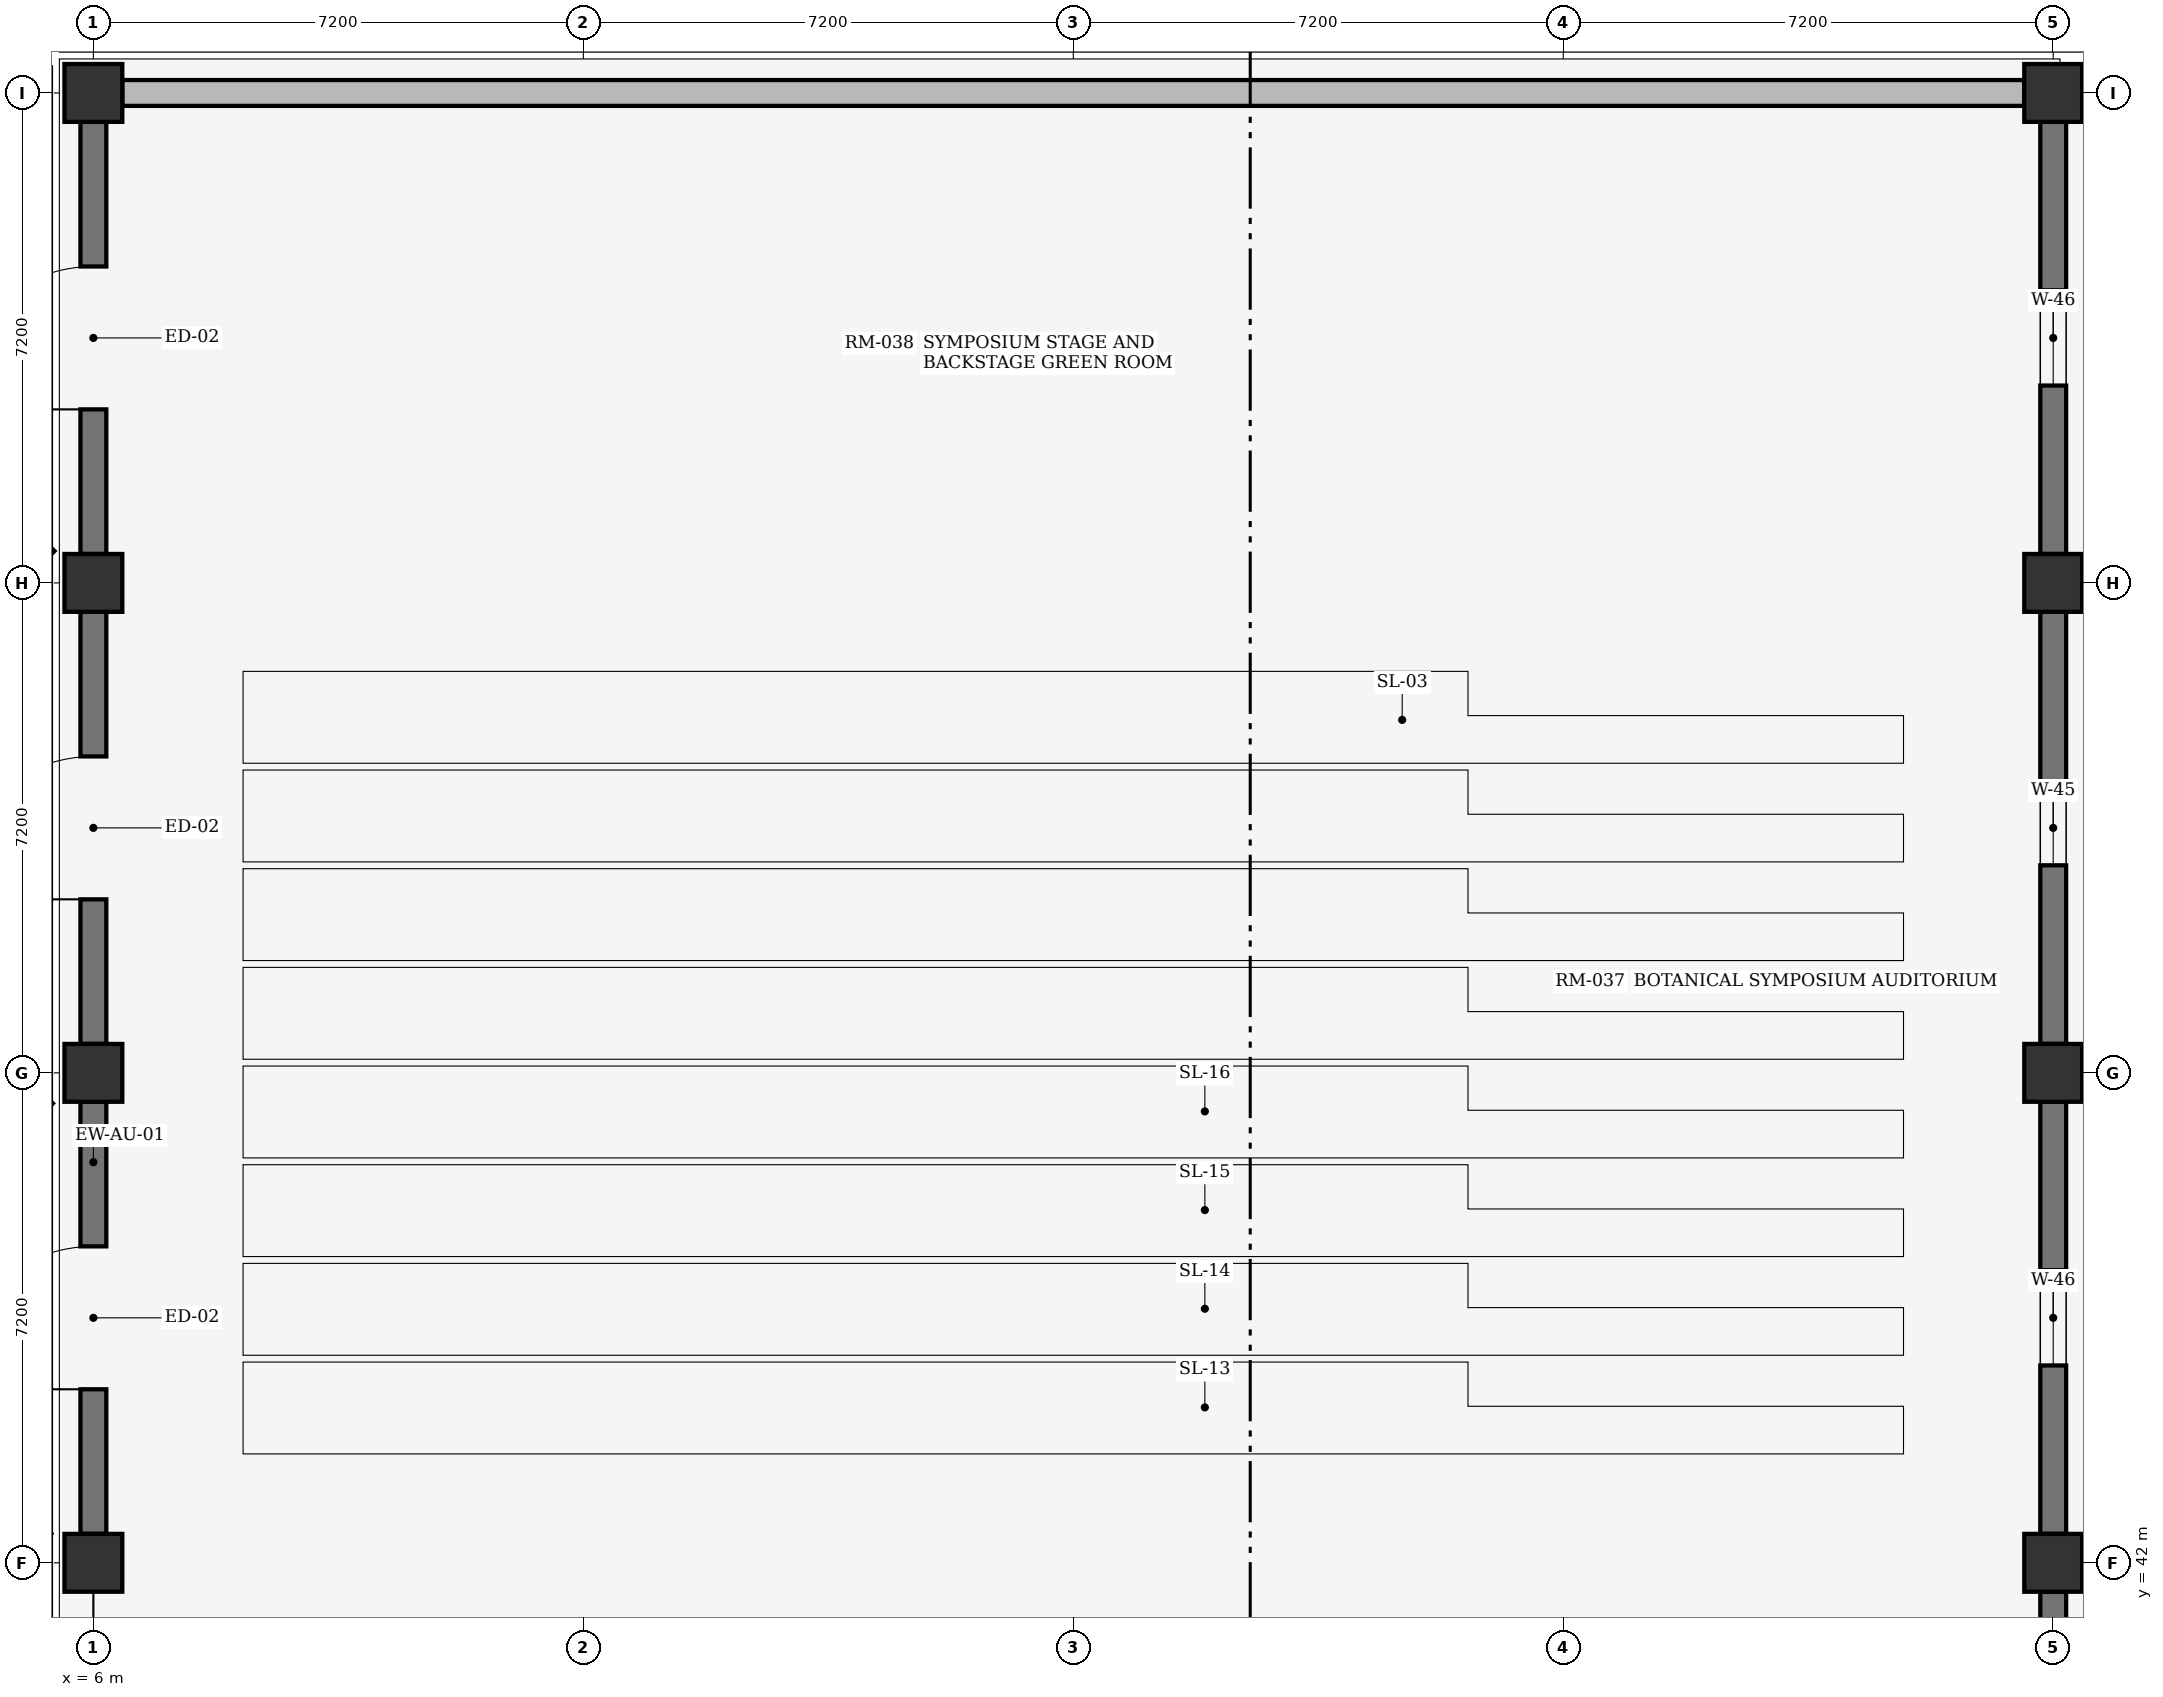
"""IFC4 building model, lengths in metres.
Left out: names, types, materials, properties, quantities, classifications, styles, units other than length and angle.
Written with IfcOpenShell. Run it as: python <this file> out.ifc"""

import sys

from ifc_helpers import new_model, si_unit, direction, frame, frame_2d, origin, origin_2d, place, context, subcontext, project, spatial, rectangle, extrude, element, fill, save


model = new_model("IFC4")
c1 = context("Model", 3, precision=1e-05, world=origin(), true_north=direction((0.0, 1.0)))
c2 = subcontext(c1, "Body", "Model", "MODEL_VIEW")
j1 = project(units=[si_unit("LENGTHUNIT", "METRE"), si_unit("PLANEANGLEUNIT", "RADIAN")], contexts=[c1])
p1 = place(None, origin())
s1 = spatial("IfcSite", under=j1, at=p1, CompositionType="ELEMENT")
p2 = place(p1, origin())
s2 = spatial("IfcBuilding", under=s1, at=p2, CompositionType="ELEMENT")
p3 = place(p2, origin())
s3 = spatial("IfcBuildingStorey", under=s2, at=p3, CompositionType="ELEMENT", Elevation=0.0)
p4 = place(p3, frame((6.0, 42.0, 0.0), z_axis=(0.0, 0.0, 1.0), x_axis=(1.0, 0.0, 0.0)))
e1 = element("IfcColumn", 1, at=p4, inside=s3, PredefinedType="COLUMN", context=c2, shape_type="SweptSolid", body=[
    extrude(rectangle(XDim=0.85, YDim=0.85, at=origin_2d()), origin(), (0.0, 0.0, 1.0), 4.55),
])
for number, where, z_axis, x_axis in (
    (2, (6.0, 49.2, 0.0), (0.0, 0.0, 1.0), (1.0, 0.0, 0.0)),
    (3, (6.0, 56.4, 0.0), (0.0, 0.0, 1.0), (1.0, 0.0, 0.0)),
    (4, (6.0, 63.6, 0.0), (0.0, 0.0, 1.0), (1.0, 0.0, 0.0)),
):
    element("IfcColumn", number, at=place(p3, frame(where, z_axis=z_axis, x_axis=x_axis)), inside=s3, PredefinedType="COLUMN", context=c2, shape_type="SweptSolid", body=[
        extrude(rectangle(XDim=0.85, YDim=0.85, at=origin_2d()), origin(), (0.0, 0.0, 1.0), 4.8),
    ])
p5 = place(p3, frame((34.8, 42.0, 0.0), z_axis=(0.0, 0.0, 1.0), x_axis=(1.0, 0.0, 0.0)))
e5 = element("IfcColumn", 5, at=p5, inside=s3, PredefinedType="COLUMN", context=c2, shape_type="SweptSolid", body=[
    extrude(rectangle(XDim=0.85, YDim=0.85, at=origin_2d()), origin(), (0.0, 0.0, 1.0), 4.55),
])
for number, where, z_axis, x_axis in (
    (6, (34.8, 49.2, 0.0), (0.0, 0.0, 1.0), (1.0, 0.0, 0.0)),
    (7, (34.8, 56.4, 0.0), (0.0, 0.0, 1.0), (1.0, 0.0, 0.0)),
    (8, (34.8, 63.6, 0.0), (0.0, 0.0, 1.0), (1.0, 0.0, 0.0)),
):
    element("IfcColumn", number, at=place(p3, frame(where, z_axis=z_axis, x_axis=x_axis)), inside=s3, PredefinedType="COLUMN", context=c2, shape_type="SweptSolid", body=[
        extrude(rectangle(XDim=0.85, YDim=0.85, at=origin_2d()), origin(), (0.0, 0.0, 1.0), 4.8),
    ])
p6 = place(p3, frame((6.0, 42.425, 0.0), z_axis=(0.0, 0.0, 1.0), x_axis=(0.0, 1.0, 0.0)))
e9 = element("IfcWall", 9, at=p6, inside=s3, PredefinedType="STANDARD", context=c2, shape_type="SweptSolid", body=[
    extrude(rectangle(XDim=6.35, YDim=0.38, at=frame_2d((3.175, 0.0))), origin(), (0.0, 0.0, 1.0), 4.8),
])
p7 = place(p6, frame((2.125, 0.0, 0.0)))
e10 = element("IfcOpeningElement", 10, at=p7, cuts=e9, PredefinedType="OPENING", context=c2, shape_type="SweptSolid", body=[
    extrude(rectangle(XDim=2.1, YDim=2.4, at=frame_2d((1.05, 1.2))), frame((0.0, 0.2, 0.0), z_axis=(0.0, -1.0, 0.0), x_axis=(1.0, 0.0, 0.0)), (0.0, 0.0, 1.0), 0.4),
])
p8 = place(p3, frame((6.0, 49.625, 0.0), z_axis=(0.0, 0.0, 1.0), x_axis=(0.0, 1.0, 0.0)))
e11 = element("IfcWall", 11, at=p8, inside=s3, PredefinedType="STANDARD", context=c2, shape_type="SweptSolid", body=[
    extrude(rectangle(XDim=6.35, YDim=0.38, at=frame_2d((3.175, 0.0))), origin(), (0.0, 0.0, 1.0), 4.8),
])
p9 = place(p8, frame((2.125, 0.0, 0.0)))
e12 = element("IfcOpeningElement", 12, at=p9, cuts=e11, PredefinedType="OPENING", context=c2, shape_type="SweptSolid", body=[
    extrude(rectangle(XDim=2.1, YDim=2.4, at=frame_2d((1.05, 1.2))), frame((0.0, 0.2, 0.0), z_axis=(0.0, -1.0, 0.0), x_axis=(1.0, 0.0, 0.0)), (0.0, 0.0, 1.0), 0.4),
])
p10 = place(p3, frame((6.0, 56.825, 0.0), z_axis=(0.0, 0.0, 1.0), x_axis=(0.0, 1.0, 0.0)))
e13 = element("IfcWall", 13, at=p10, inside=s3, PredefinedType="STANDARD", context=c2, shape_type="SweptSolid", body=[
    extrude(rectangle(XDim=6.35, YDim=0.38, at=frame_2d((3.175, 0.0))), origin(), (0.0, 0.0, 1.0), 4.8),
])
p11 = place(p10, frame((2.125, 0.0, 0.0)))
e14 = element("IfcOpeningElement", 14, at=p11, cuts=e13, PredefinedType="OPENING", context=c2, shape_type="SweptSolid", body=[
    extrude(rectangle(XDim=2.1, YDim=2.4, at=frame_2d((1.05, 1.2))), frame((0.0, 0.2, 0.0), z_axis=(0.0, -1.0, 0.0), x_axis=(1.0, 0.0, 0.0)), (0.0, 0.0, 1.0), 0.4),
])
p12 = place(p3, frame((34.8, 35.225, 0.0), z_axis=(0.0, 0.0, 1.0), x_axis=(0.0, 1.0, 0.0)))
e15 = element("IfcWall", 15, at=p12, inside=s3, PredefinedType="STANDARD", context=c2, shape_type="SweptSolid", body=[
    extrude(rectangle(XDim=6.35, YDim=0.38, at=frame_2d((3.175, 0.0))), origin(), (0.0, 0.0, 1.0), 4.8),
])
p13 = place(p12, frame((2.225, 0.0, 0.0)))
e16 = element("IfcOpeningElement", 16, at=p13, cuts=e15, PredefinedType="OPENING", context=c2, shape_type="SweptSolid", body=[
    extrude(rectangle(XDim=1.9, YDim=2.3, at=frame_2d((0.95, 1.15))), frame((0.0, 0.2, 0.0), z_axis=(0.0, -1.0, 0.0), x_axis=(1.0, 0.0, 0.0)), (0.0, 0.0, 1.0), 0.4),
])
p14 = place(p3, frame((34.8, 42.425, 0.0), z_axis=(0.0, 0.0, 1.0), x_axis=(0.0, 1.0, 0.0)))
e17 = element("IfcWall", 17, at=p14, inside=s3, PredefinedType="STANDARD", context=c2, shape_type="SweptSolid", body=[
    extrude(rectangle(XDim=6.35, YDim=0.38, at=frame_2d((3.175, 0.0))), origin(), (0.0, 0.0, 1.0), 4.8),
])
p15 = place(p14, frame((2.475, 0.0, 0.75)))
e18 = element("IfcOpeningElement", 18, at=p15, cuts=e17, PredefinedType="OPENING", context=c2, shape_type="SweptSolid", body=[
    extrude(rectangle(XDim=1.4, YDim=1.25, at=frame_2d((0.7, 0.625))), frame((0.0, 0.2, 0.0), z_axis=(0.0, -1.0, 0.0), x_axis=(1.0, 0.0, 0.0)), (0.0, 0.0, 1.0), 0.4),
])
p16 = place(p3, frame((34.8, 49.625, 0.0), z_axis=(0.0, 0.0, 1.0), x_axis=(0.0, 1.0, 0.0)))
e19 = element("IfcWall", 19, at=p16, inside=s3, PredefinedType="STANDARD", context=c2, shape_type="SweptSolid", body=[
    extrude(rectangle(XDim=6.35, YDim=0.38, at=frame_2d((3.175, 0.0))), origin(), (0.0, 0.0, 1.0), 4.8),
])
p17 = place(p16, frame((2.625, 0.0, 0.75)))
e20 = element("IfcOpeningElement", 20, at=p17, cuts=e19, PredefinedType="OPENING", context=c2, shape_type="SweptSolid", body=[
    extrude(rectangle(XDim=1.1, YDim=1.25, at=frame_2d((0.55, 0.625))), frame((0.0, 0.2, 0.0), z_axis=(0.0, -1.0, 0.0), x_axis=(1.0, 0.0, 0.0)), (0.0, 0.0, 1.0), 0.4),
])
p18 = place(p3, frame((34.8, 56.825, 0.0), z_axis=(0.0, 0.0, 1.0), x_axis=(0.0, 1.0, 0.0)))
e21 = element("IfcWall", 21, at=p18, inside=s3, PredefinedType="STANDARD", context=c2, shape_type="SweptSolid", body=[
    extrude(rectangle(XDim=6.35, YDim=0.38, at=frame_2d((3.175, 0.0))), origin(), (0.0, 0.0, 1.0), 4.8),
])
p19 = place(p18, frame((2.475, 0.0, 0.75)))
e22 = element("IfcOpeningElement", 22, at=p19, cuts=e21, PredefinedType="OPENING", context=c2, shape_type="SweptSolid", body=[
    extrude(rectangle(XDim=1.4, YDim=1.25, at=frame_2d((0.7, 0.625))), frame((0.0, 0.2, 0.0), z_axis=(0.0, -1.0, 0.0), x_axis=(1.0, 0.0, 0.0)), (0.0, 0.0, 1.0), 0.4),
])
p20 = place(p3, frame((6.425, 63.6, 0.0), z_axis=(0.0, 0.0, 1.0), x_axis=(1.0, 0.0, 0.0)))
e23 = element("IfcWall", 23, at=p20, inside=s3, PredefinedType="STANDARD", context=c2, shape_type="SweptSolid", body=[
    extrude(rectangle(XDim=27.95, YDim=0.38, at=frame_2d((13.975, 0.0))), origin(), (0.0, 0.0, 1.0), 4.8),
])
p21 = place(p7, origin())
e24 = element("IfcDoor", 24, at=p21, inside=s3, OperationType="DOUBLE_DOOR_SINGLE_SWING", PredefinedType="DOOR", context=c2, shape_type="SweptSolid", body=[
    extrude(rectangle(XDim=2.1, YDim=2.4, at=frame_2d((1.05, 1.2))), frame((0.0, 0.025, 0.0), z_axis=(0.0, -1.0, 0.0), x_axis=(1.0, 0.0, 0.0)), (0.0, 0.0, 1.0), 0.05),
])
fill(e10, e24)
p22 = place(p9, origin())
e25 = element("IfcDoor", 25, at=p22, inside=s3, OperationType="DOUBLE_DOOR_SINGLE_SWING", PredefinedType="DOOR", context=c2, shape_type="SweptSolid", body=[
    extrude(rectangle(XDim=2.1, YDim=2.4, at=frame_2d((1.05, 1.2))), frame((0.0, 0.025, 0.0), z_axis=(0.0, -1.0, 0.0), x_axis=(1.0, 0.0, 0.0)), (0.0, 0.0, 1.0), 0.05),
])
fill(e12, e25)
p23 = place(p11, origin())
e26 = element("IfcDoor", 26, at=p23, inside=s3, OperationType="DOUBLE_DOOR_SINGLE_SWING", PredefinedType="DOOR", context=c2, shape_type="SweptSolid", body=[
    extrude(rectangle(XDim=2.1, YDim=2.4, at=frame_2d((1.05, 1.2))), frame((0.0, 0.025, 0.0), z_axis=(0.0, -1.0, 0.0), x_axis=(1.0, 0.0, 0.0)), (0.0, 0.0, 1.0), 0.05),
])
fill(e14, e26)
p24 = place(p15, origin())
e27 = element("IfcWindow", 27, at=p24, inside=s3, PartitioningType="SINGLE_PANEL", PredefinedType="WINDOW", context=c2, shape_type="SweptSolid", body=[
    extrude(rectangle(XDim=1.4, YDim=1.25, at=frame_2d((0.7, 0.625))), frame((0.0, 0.03, 0.0), z_axis=(0.0, -1.0, 0.0), x_axis=(1.0, 0.0, 0.0)), (0.0, 0.0, 1.0), 0.06),
])
fill(e18, e27)
p25 = place(p17, origin())
e28 = element("IfcWindow", 28, at=p25, inside=s3, PartitioningType="SINGLE_PANEL", PredefinedType="WINDOW", context=c2, shape_type="SweptSolid", body=[
    extrude(rectangle(XDim=1.1, YDim=1.25, at=frame_2d((0.55, 0.625))), frame((0.0, 0.03, 0.0), z_axis=(0.0, -1.0, 0.0), x_axis=(1.0, 0.0, 0.0)), (0.0, 0.0, 1.0), 0.06),
])
fill(e20, e28)
p26 = place(p19, origin())
e29 = element("IfcWindow", 29, at=p26, inside=s3, PartitioningType="SINGLE_PANEL", PredefinedType="WINDOW", context=c2, shape_type="SweptSolid", body=[
    extrude(rectangle(XDim=1.4, YDim=1.25, at=frame_2d((0.7, 0.625))), frame((0.0, 0.03, 0.0), z_axis=(0.0, -1.0, 0.0), x_axis=(1.0, 0.0, 0.0)), (0.0, 0.0, 1.0), 0.06),
])
fill(e22, e29)
save(model, sys.argv[1])
